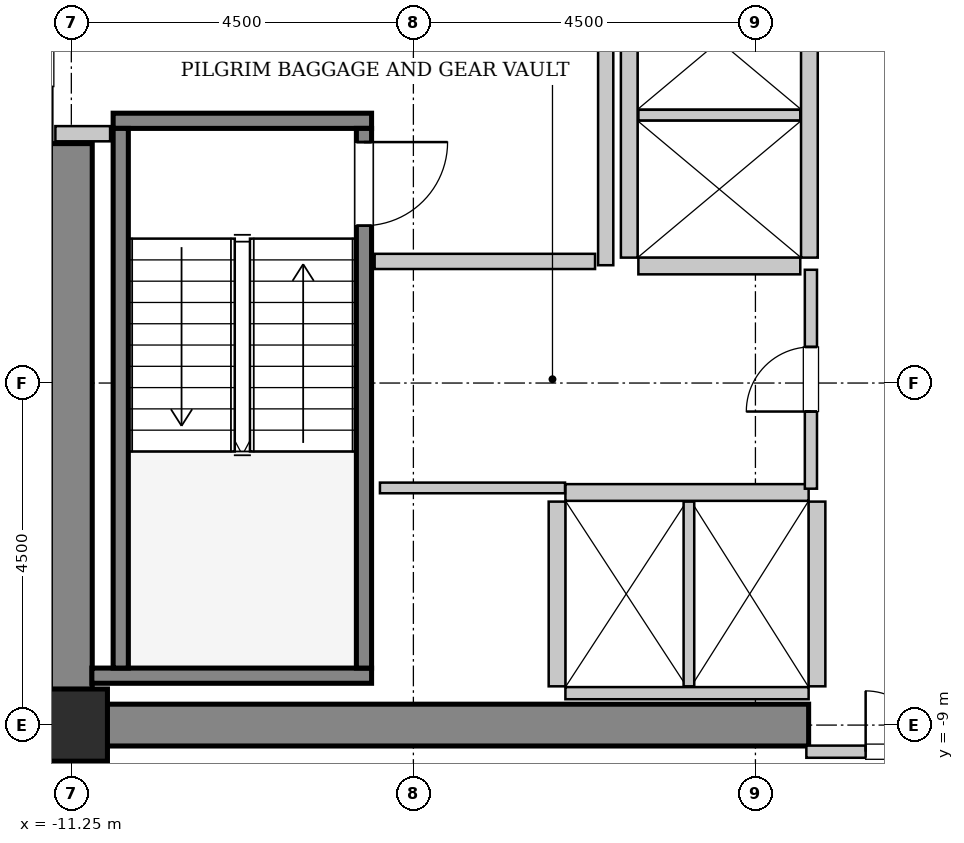
"""IFC4 building model, lengths in metres.
Left out: names, types, materials, properties, quantities, classifications, styles, units other than length and angle.
Written with IfcOpenShell. Run it as: python <this file> out.ifc"""

import sys

from ifc_helpers import new_model, si_unit, direction, frame, frame_2d, origin, origin_2d, place, context, subcontext, project, spatial, rectangle, hollow_rectangle, extrude, source, transform, mapped, element, fill, save


model = new_model("IFC4")
c1 = context("Model", 3, precision=1e-05, world=origin(), true_north=direction((0.0, 1.0)))
c2 = subcontext(c1, "Body", "Model", "MODEL_VIEW")
j1 = project(units=[si_unit("LENGTHUNIT", "METRE"), si_unit("PLANEANGLEUNIT", "RADIAN")], contexts=[c1])
p1 = place(None, origin())
s1 = spatial("IfcSite", under=j1, at=p1, CompositionType="ELEMENT")
p2 = place(p1, origin())
s2 = spatial("IfcBuilding", under=s1, at=p2, CompositionType="ELEMENT")
p3 = place(p2, frame((0.0, 0.0, 128.8)))
s3 = spatial("IfcBuildingStorey", under=s2, at=p3, CompositionType="ELEMENT", Elevation=128.8)
m1 = source(origin(), c2, "Body", "SweptSolid", [
    extrude(rectangle(XDim=9.975, YDim=0.55, at=frame_2d((4.987, 0.0))), origin(), (0.0, 0.0, 1.0), 3.8),
])
p4 = place(p3, frame((-11.525, -9.0, 0.0), z_axis=(0.0, 0.0, 1.0), x_axis=(1.0, 0.0, 0.0)))
e1 = element("IfcWall", 1, at=p4, inside=s3, PredefinedType="SHEAR", context=c2, shape_type="MappedRepresentation", body=[
    mapped(m1, transform((0.0, 0.0, 0.0), x_axis=(1.0, 0.0, 0.0), y_axis=(0.0, 1.0, 0.0), z_axis=(0.0, 0.0, 1.0), scale=1.0)),
])
m2 = source(origin(), c2, "Body", "SweptSolid", [
    extrude(rectangle(XDim=7.375, YDim=0.55, at=frame_2d((3.688, 0.0))), origin(), (0.0, 0.0, 1.0), 3.8),
])
p5 = place(p3, frame((-11.25, -8.725, 0.0), z_axis=(0.0, 0.0, 1.0), x_axis=(0.0, 1.0, 0.0)))
e2 = element("IfcWall", 2, at=p5, inside=s3, PredefinedType="SHEAR", context=c2, shape_type="MappedRepresentation", body=[
    mapped(m2, transform((0.0, 0.0, 0.0), x_axis=(1.0, 0.0, 0.0), y_axis=(0.0, 1.0, 0.0), z_axis=(0.0, 0.0, 1.0), scale=1.0)),
])
m3 = source(origin(), c2, "Body", "SweptSolid", [
    extrude(hollow_rectangle(XDim=0.95, YDim=0.95, WallThickness=0.045, InnerFilletRadius=0.045, OuterFilletRadius=0.09, at=origin_2d()), origin(), (0.0, 0.0, 1.0), 3.8),
])
p6 = place(p3, frame((-11.25, -9.0, 0.0), z_axis=(0.0, 0.0, 1.0), x_axis=(1.0, 0.0, 0.0)))
e3 = element("IfcColumn", 3, at=p6, inside=s3, PredefinedType="COLUMN", context=c2, shape_type="MappedRepresentation", body=[
    mapped(m3, transform((0.0, 0.0, 0.0), x_axis=(1.0, 0.0, 0.0), y_axis=(0.0, 1.0, 0.0), z_axis=(0.0, 0.0, 1.0), scale=1.0)),
])
m4 = source(origin(), c2, "Body", "SweptSolid", [
    extrude(rectangle(XDim=3.4, YDim=0.2, at=frame_2d((1.7, 0.0))), origin(), (0.0, 0.0, 1.0), 3.8),
])
p7 = place(p3, frame((-10.7, -1.05, 0.0), z_axis=(0.0, 0.0, 1.0), x_axis=(1.0, 0.0, 0.0)))
e4 = element("IfcWall", 4, at=p7, inside=s3, PredefinedType="SOLIDWALL", context=c2, shape_type="MappedRepresentation", body=[
    mapped(m4, transform((0.0, 0.0, 0.0), x_axis=(1.0, 0.0, 0.0), y_axis=(0.0, 1.0, 0.0), z_axis=(0.0, 0.0, 1.0), scale=1.0)),
])
m5 = source(origin(), c2, "Body", "SweptSolid", [
    extrude(rectangle(XDim=3.68, YDim=0.2, at=frame_2d((1.84, 0.0))), origin(), (0.0, 0.0, 1.0), 3.8),
])
p8 = place(p3, frame((-10.98, -8.35, 0.0), z_axis=(0.0, 0.0, 1.0), x_axis=(1.0, 0.0, 0.0)))
e5 = element("IfcWall", 5, at=p8, inside=s3, PredefinedType="SOLIDWALL", context=c2, shape_type="MappedRepresentation", body=[
    mapped(m5, transform((0.0, 0.0, 0.0), x_axis=(1.0, 0.0, 0.0), y_axis=(0.0, 1.0, 0.0), z_axis=(0.0, 0.0, 1.0), scale=1.0)),
])
m6 = source(origin(), c2, "Body", "SweptSolid", [
    extrude(rectangle(XDim=7.1, YDim=0.2, at=frame_2d((3.55, 0.0))), origin(), (0.0, 0.0, 1.0), 3.8),
])
p9 = place(p3, frame((-10.6, -1.15, 0.0), z_axis=(0.0, 0.0, 1.0), x_axis=(0.0, -1.0, 0.0)))
e6 = element("IfcWall", 6, at=p9, inside=s3, PredefinedType="SOLIDWALL", context=c2, shape_type="MappedRepresentation", body=[
    mapped(m6, transform((0.0, 0.0, 0.0), x_axis=(1.0, 0.0, 0.0), y_axis=(0.0, 1.0, 0.0), z_axis=(0.0, 0.0, 1.0), scale=1.0)),
])
p10 = place(p3, frame((-7.4, -1.15, 0.0), z_axis=(0.0, 0.0, 1.0), x_axis=(0.0, -1.0, 0.0)))
e7 = element("IfcWall", 7, at=p10, inside=s3, PredefinedType="SOLIDWALL", context=c2, shape_type="MappedRepresentation", body=[
    mapped(m6, transform((0.0, 0.0, 0.0), x_axis=(1.0, 0.0, 0.0), y_axis=(0.0, 1.0, 0.0), z_axis=(0.0, 0.0, 1.0), scale=1.0)),
])
p11 = place(p10, frame((0.18, 0.0, 0.0)))
e8 = element("IfcOpeningElement", 8, at=p11, cuts=e7, PredefinedType="OPENING", context=c2, shape_type="SweptSolid", body=[
    extrude(rectangle(XDim=1.1, YDim=2.15, at=frame_2d((0.55, 1.075))), frame((0.0, 0.11, 0.0), z_axis=(0.0, -1.0, 0.0), x_axis=(1.0, 0.0, 0.0)), (0.0, 0.0, 1.0), 0.22),
])
m7 = source(origin(), c2, "Body", "SweptSolid", [
    extrude(rectangle(XDim=3.2, YDim=0.22, at=frame_2d((1.6, 0.0))), origin(), (0.0, 0.0, 1.0), 3.535),
])
p12 = place(p3, frame((-1.55, -5.94, 0.0), z_axis=(0.0, 0.0, 1.0), x_axis=(-1.0, 0.0, 0.0)))
e9 = element("IfcWall", 9, at=p12, inside=s3, PredefinedType="SOLIDWALL", context=c2, shape_type="MappedRepresentation", body=[
    mapped(m7, transform((0.0, 0.0, 0.0), x_axis=(1.0, 0.0, 0.0), y_axis=(0.0, 1.0, 0.0), z_axis=(0.0, 0.0, 1.0), scale=1.0)),
])
m8 = source(origin(), c2, "Body", "SweptSolid", [
    extrude(rectangle(XDim=3.2, YDim=0.16, at=frame_2d((1.6, 0.0))), origin(), (0.0, 0.0, 1.0), 2.425),
])
p13 = place(p3, frame((-4.75, -8.58, 0.0), z_axis=(0.0, 0.0, 1.0), x_axis=(1.0, 0.0, 0.0)))
e10 = element("IfcWall", 10, at=p13, inside=s3, PredefinedType="PARTITIONING", context=c2, shape_type="MappedRepresentation", body=[
    mapped(m8, transform((0.0, 0.0, 0.0), x_axis=(1.0, 0.0, 0.0), y_axis=(0.0, 1.0, 0.0), z_axis=(0.0, 0.0, 1.0), scale=1.0)),
])
m9 = source(origin(), c2, "Body", "SweptSolid", [
    extrude(rectangle(XDim=2.43, YDim=0.22, at=frame_2d((1.215, 0.0))), origin(), (0.0, 0.0, 1.0), 3.535),
])
p14 = place(p3, frame((-4.86, -6.06, 0.0), z_axis=(0.0, 0.0, 1.0), x_axis=(0.0, -1.0, 0.0)))
e11 = element("IfcWall", 11, at=p14, inside=s3, PredefinedType="SOLIDWALL", context=c2, shape_type="MappedRepresentation", body=[
    mapped(m9, transform((0.0, 0.0, 0.0), x_axis=(1.0, 0.0, 0.0), y_axis=(0.0, 1.0, 0.0), z_axis=(0.0, 0.0, 1.0), scale=1.0)),
])
m10 = source(origin(), c2, "Body", "SweptSolid", [
    extrude(rectangle(XDim=2.43, YDim=0.14, at=frame_2d((1.215, 0.0))), origin(), (0.0, 0.0, 1.0), 3.535),
])
p15 = place(p3, frame((-3.125, -8.49, 0.0), z_axis=(0.0, 0.0, 1.0), x_axis=(0.0, 1.0, 0.0)))
e12 = element("IfcWall", 12, at=p15, inside=s3, PredefinedType="PARTITIONING", context=c2, shape_type="MappedRepresentation", body=[
    mapped(m10, transform((0.0, 0.0, 0.0), x_axis=(1.0, 0.0, 0.0), y_axis=(0.0, 1.0, 0.0), z_axis=(0.0, 0.0, 1.0), scale=1.0)),
])
p16 = place(p3, frame((-1.44, -8.49, 0.0), z_axis=(0.0, 0.0, 1.0), x_axis=(0.0, 1.0, 0.0)))
e13 = element("IfcWall", 13, at=p16, inside=s3, PredefinedType="SOLIDWALL", context=c2, shape_type="MappedRepresentation", body=[
    mapped(m9, transform((0.0, 0.0, 0.0), x_axis=(1.0, 0.0, 0.0), y_axis=(0.0, 1.0, 0.0), z_axis=(0.0, 0.0, 1.0), scale=1.0)),
])
m11 = source(origin(), c2, "Body", "SweptSolid", [
    extrude(rectangle(XDim=5.7, YDim=0.22, at=frame_2d((2.85, 0.0))), origin(), (0.0, 0.0, 1.0), 3.535),
])
for number, where, z_axis, x_axis in (
    (14, (-1.54, -2.85, 0.0), (0.0, 0.0, 1.0), (0.0, 1.0, 0.0)),
    (15, (-3.91, 2.85, 0.0), (0.0, 0.0, 1.0), (0.0, -1.0, 0.0)),
):
    element("IfcWall", number, at=place(p3, frame(where, z_axis=z_axis, x_axis=x_axis)), inside=s3, PredefinedType="SOLIDWALL", context=c2, shape_type="MappedRepresentation", body=[
        mapped(m11, transform((0.0, 0.0, 0.0), x_axis=(1.0, 0.0, 0.0), y_axis=(0.0, 1.0, 0.0), z_axis=(0.0, 0.0, 1.0), scale=1.0)),
    ])
m12 = source(origin(), c2, "Body", "SweptSolid", [
    extrude(rectangle(XDim=2.13, YDim=0.22, at=frame_2d((1.065, 0.0))), origin(), (0.0, 0.0, 1.0), 3.535),
])
p17 = place(p3, frame((-3.79, -2.96, 0.0), z_axis=(0.0, 0.0, 1.0), x_axis=(1.0, 0.0, 0.0)))
e16 = element("IfcWall", 16, at=p17, inside=s3, PredefinedType="SOLIDWALL", context=c2, shape_type="MappedRepresentation", body=[
    mapped(m12, transform((0.0, 0.0, 0.0), x_axis=(1.0, 0.0, 0.0), y_axis=(0.0, 1.0, 0.0), z_axis=(0.0, 0.0, 1.0), scale=1.0)),
])
m13 = source(origin(), c2, "Body", "SweptSolid", [
    extrude(rectangle(XDim=2.13, YDim=0.14, at=frame_2d((1.065, 0.0))), origin(), (0.0, 0.0, 1.0), 3.535),
])
p18 = place(p3, frame((-3.79, -0.975, 0.0), z_axis=(0.0, 0.0, 1.0), x_axis=(1.0, 0.0, 0.0)))
e17 = element("IfcWall", 17, at=p18, inside=s3, PredefinedType="PARTITIONING", context=c2, shape_type="MappedRepresentation", body=[
    mapped(m13, transform((0.0, 0.0, 0.0), x_axis=(1.0, 0.0, 0.0), y_axis=(0.0, 1.0, 0.0), z_axis=(0.0, 0.0, 1.0), scale=1.0)),
])
m14 = source(origin(), c2, "Body", "SweptSolid", [
    extrude(rectangle(XDim=5.9, YDim=0.2, at=frame_2d((2.95, 0.0))), origin(), (0.0, 0.0, 1.0), 3.535),
])
p19 = place(p3, frame((-4.22, -2.95, 0.0), z_axis=(0.0, 0.0, 1.0), x_axis=(0.0, 1.0, 0.0)))
e18 = element("IfcWall", 18, at=p19, inside=s3, PredefinedType="PARTITIONING", context=c2, shape_type="MappedRepresentation", body=[
    mapped(m14, transform((0.0, 0.0, 0.0), x_axis=(1.0, 0.0, 0.0), y_axis=(0.0, 1.0, 0.0), z_axis=(0.0, 0.0, 1.0), scale=1.0)),
])
m15 = source(origin(), c2, "Body", "SweptSolid", [
    extrude(rectangle(XDim=2.9, YDim=0.2, at=frame_2d((1.45, 0.0))), origin(), (0.0, 0.0, 1.0), 3.535),
])
p20 = place(p3, frame((-7.26, -2.9, 0.0), z_axis=(0.0, 0.0, 1.0), x_axis=(1.0, 0.0, 0.0)))
e19 = element("IfcWall", 19, at=p20, inside=s3, PredefinedType="PARTITIONING", context=c2, shape_type="MappedRepresentation", body=[
    mapped(m15, transform((0.0, 0.0, 0.0), x_axis=(1.0, 0.0, 0.0), y_axis=(0.0, 1.0, 0.0), z_axis=(0.0, 0.0, 1.0), scale=1.0)),
])
m16 = source(origin(), c2, "Body", "SweptSolid", [
    extrude(rectangle(XDim=0.72, YDim=0.2, at=frame_2d((0.36, 0.0))), origin(), (0.0, 0.0, 1.0), 3.535),
])
p21 = place(p3, frame((-11.46, -1.22, 0.0), z_axis=(0.0, 0.0, 1.0), x_axis=(1.0, 0.0, 0.0)))
e20 = element("IfcWall", 20, at=p21, inside=s3, PredefinedType="PARTITIONING", context=c2, shape_type="MappedRepresentation", body=[
    mapped(m16, transform((0.0, 0.0, 0.0), x_axis=(1.0, 0.0, 0.0), y_axis=(0.0, 1.0, 0.0), z_axis=(0.0, 0.0, 1.0), scale=1.0)),
])
m17 = source(origin(), c2, "Body", "SweptSolid", [
    extrude(rectangle(XDim=3.16, YDim=0.16, at=frame_2d((1.58, 0.0))), origin(), (0.0, 0.0, 1.0), 2.425),
])
p22 = place(p3, frame((-1.58, -9.35, 0.0), z_axis=(0.0, 0.0, 1.0), x_axis=(1.0, 0.0, 0.0)))
e21 = element("IfcWall", 21, at=p22, inside=s3, PredefinedType="PARTITIONING", context=c2, shape_type="MappedRepresentation", body=[
    mapped(m17, transform((0.0, 0.0, 0.0), x_axis=(1.0, 0.0, 0.0), y_axis=(0.0, 1.0, 0.0), z_axis=(0.0, 0.0, 1.0), scale=1.0)),
])
p23 = place(p22, frame((0.78, 0.0, 0.0)))
e22 = element("IfcOpeningElement", 22, at=p23, cuts=e21, PredefinedType="OPENING", context=c2, shape_type="SweptSolid", body=[
    extrude(rectangle(XDim=1.6, YDim=2.3, at=frame_2d((0.8, 1.15))), frame((0.0, 0.09, 0.0), z_axis=(0.0, -1.0, 0.0), x_axis=(1.0, 0.0, 0.0)), (0.0, 0.0, 1.0), 0.18),
])
m18 = source(origin(), c2, "Body", "SweptSolid", [
    extrude(rectangle(XDim=2.88, YDim=0.16, at=frame_2d((1.44, 0.0))), origin(), (0.0, 0.0, 1.0), 3.535),
])
p24 = place(p3, frame((-1.52, -5.89, 0.0), z_axis=(0.0, 0.0, 1.0), x_axis=(0.0, 1.0, 0.0)))
e23 = element("IfcWall", 23, at=p24, inside=s3, PredefinedType="PARTITIONING", context=c2, shape_type="MappedRepresentation", body=[
    mapped(m18, transform((0.0, 0.0, 0.0), x_axis=(1.0, 0.0, 0.0), y_axis=(0.0, 1.0, 0.0), z_axis=(0.0, 0.0, 1.0), scale=1.0)),
])
p25 = place(p24, frame((1.015, 0.0, 0.0)))
e24 = element("IfcOpeningElement", 24, at=p25, cuts=e23, PredefinedType="OPENING", context=c2, shape_type="SweptSolid", body=[
    extrude(rectangle(XDim=0.85, YDim=2.1, at=frame_2d((0.425, 1.05))), frame((0.0, 0.09, 0.0), z_axis=(0.0, -1.0, 0.0), x_axis=(1.0, 0.0, 0.0)), (0.0, 0.0, 1.0), 0.18),
])
m19 = source(origin(), c2, "Body", "SweptSolid", [
    extrude(rectangle(XDim=2.435, YDim=0.14, at=frame_2d((1.218, 0.0))), origin(), (0.0, 0.0, 1.0), 3.535),
])
p26 = place(p3, frame((-7.19, -5.88, 0.0), z_axis=(0.0, 0.0, 1.0), x_axis=(1.0, 0.0, 0.0)))
e25 = element("IfcWall", 25, at=p26, inside=s3, PredefinedType="PARTITIONING", context=c2, shape_type="MappedRepresentation", body=[
    mapped(m19, transform((0.0, 0.0, 0.0), x_axis=(1.0, 0.0, 0.0), y_axis=(0.0, 1.0, 0.0), z_axis=(0.0, 0.0, 1.0), scale=1.0)),
])
m20 = source(origin(), c2, "Body", "SweptSolid", [
    extrude(rectangle(XDim=1.1, YDim=2.15, at=frame_2d((0.55, 1.075))), frame((0.0, 0.025, 0.0), z_axis=(0.0, -1.0, 0.0), x_axis=(1.0, 0.0, 0.0)), (0.0, 0.0, 1.0), 0.05),
])
p27 = place(p11, origin())
e26 = element("IfcDoor", 26, at=p27, inside=s3, OperationType="SINGLE_SWING_LEFT", PredefinedType="DOOR", context=c2, shape_type="MappedRepresentation", body=[
    mapped(m20, transform((0.0, 0.0, 0.0), x_axis=(1.0, 0.0, 0.0), y_axis=(0.0, 1.0, 0.0), z_axis=(0.0, 0.0, 1.0), scale=1.0)),
])
fill(e8, e26)
m21 = source(origin(), c2, "Body", "SweptSolid", [
    extrude(rectangle(XDim=1.6, YDim=2.3, at=frame_2d((0.8, 1.15))), frame((0.0, 0.025, 0.0), z_axis=(0.0, -1.0, 0.0), x_axis=(1.0, 0.0, 0.0)), (0.0, 0.0, 1.0), 0.05),
])
p28 = place(p23, origin())
e27 = element("IfcDoor", 27, at=p28, inside=s3, OperationType="DOUBLE_DOOR_SINGLE_SWING", PredefinedType="DOOR", context=c2, shape_type="MappedRepresentation", body=[
    mapped(m21, transform((0.0, 0.0, 0.0), x_axis=(1.0, 0.0, 0.0), y_axis=(0.0, 1.0, 0.0), z_axis=(0.0, 0.0, 1.0), scale=1.0)),
])
fill(e22, e27)
m22 = source(origin(), c2, "Body", "SweptSolid", [
    extrude(rectangle(XDim=0.85, YDim=2.1, at=frame_2d((0.425, 1.05))), frame((0.0, 0.025, 0.0), z_axis=(0.0, -1.0, 0.0), x_axis=(1.0, 0.0, 0.0)), (0.0, 0.0, 1.0), 0.05),
])
p29 = place(p25, origin())
e28 = element("IfcDoor", 28, at=p29, inside=s3, OperationType="SINGLE_SWING_LEFT", PredefinedType="DOOR", context=c2, shape_type="MappedRepresentation", body=[
    mapped(m22, transform((0.0, 0.0, 0.0), x_axis=(1.0, 0.0, 0.0), y_axis=(0.0, 1.0, 0.0), z_axis=(0.0, 0.0, 1.0), scale=1.0)),
])
fill(e24, e28)
save(model, sys.argv[1])
